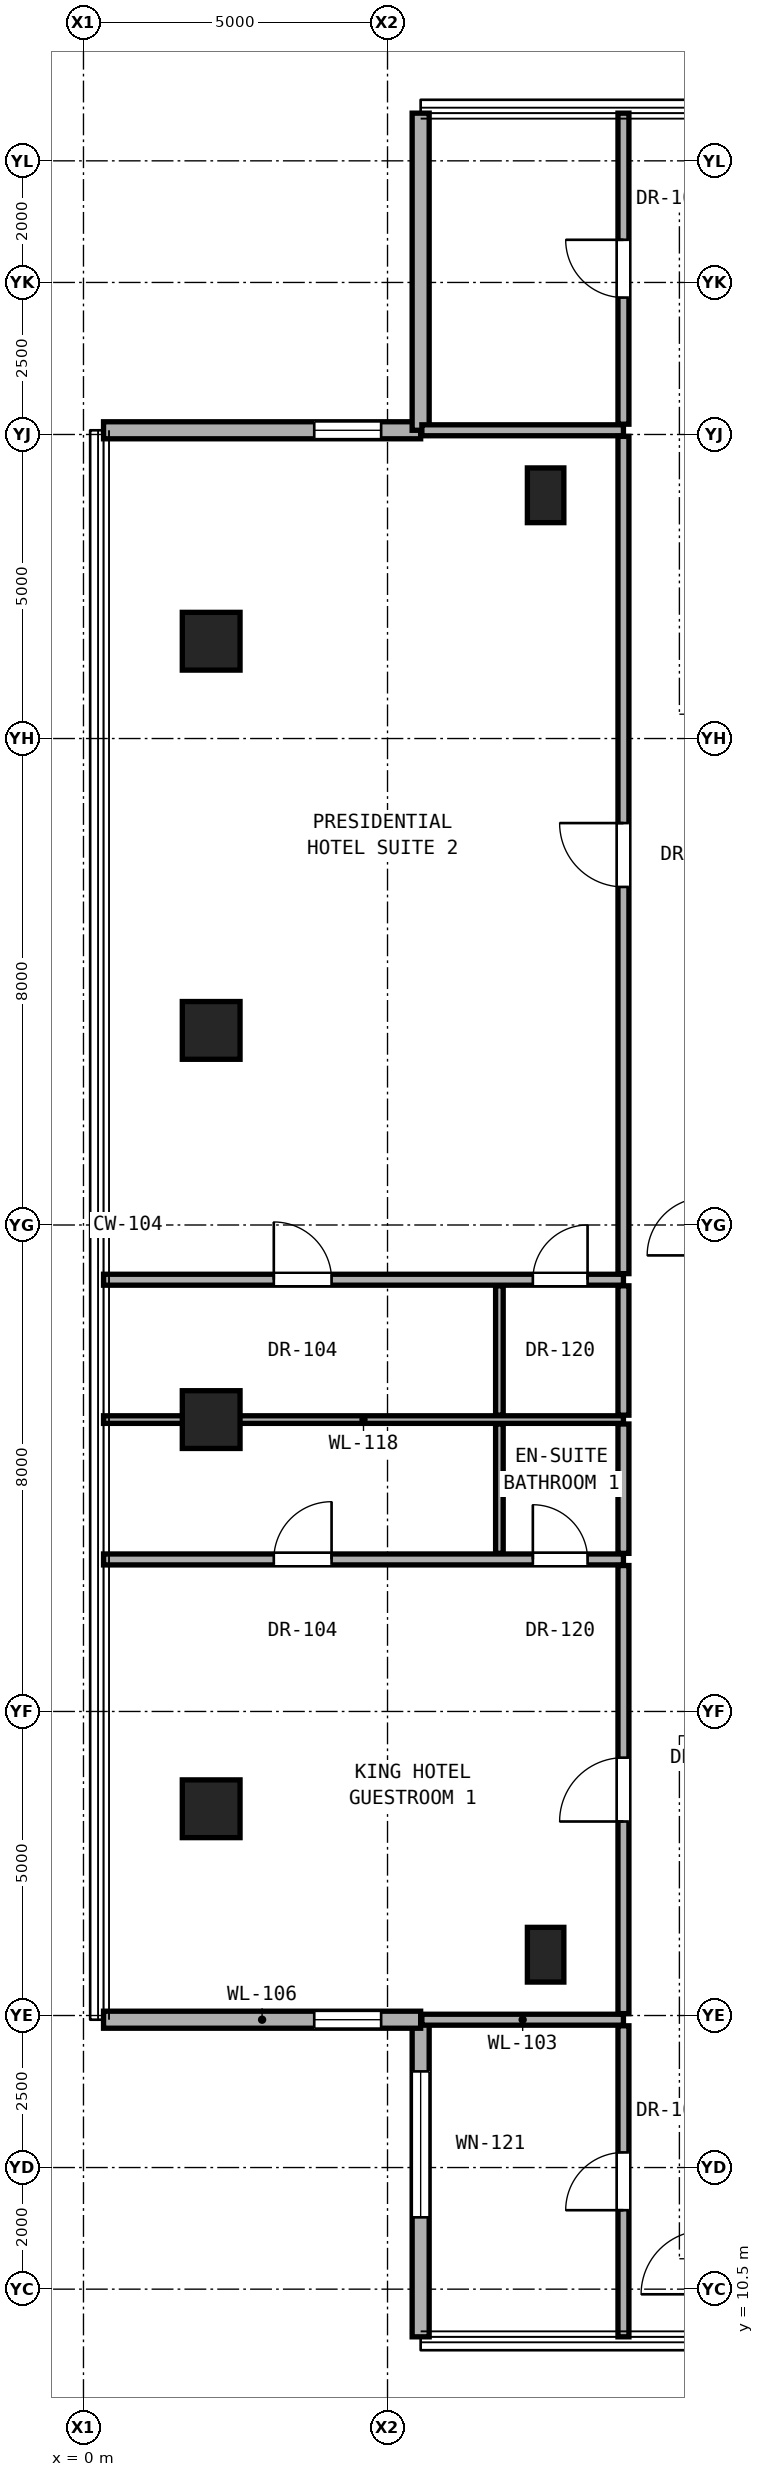
"""IFC4 building model, lengths in metres.
Left out: names, types, materials, properties, quantities, classifications, styles, units other than length and angle.
Written with IfcOpenShell. Run it as: python <this file> out.ifc"""

import sys

from ifc_helpers import new_model, si_unit, direction, frame, frame_2d, origin, origin_2d, place, context, subcontext, project, spatial, rectangle, hollow_rectangle, extrude, element, fill, save


model = new_model("IFC4")
c1 = context("Model", 3, precision=1e-05, world=origin(), true_north=direction((0.0, 1.0)))
c2 = subcontext(c1, "Body", "Model", "MODEL_VIEW")
j1 = project(units=[si_unit("LENGTHUNIT", "METRE"), si_unit("PLANEANGLEUNIT", "RADIAN")], contexts=[c1])
p1 = place(None, origin())
s1 = spatial("IfcSite", under=j1, at=p1, CompositionType="ELEMENT")
p2 = place(p1, origin())
s2 = spatial("IfcBuilding", under=s1, at=p2, CompositionType="ELEMENT")
p3 = place(p2, frame((0.0, 0.0, 193.4)))
s3 = spatial("IfcBuildingStorey", under=s2, at=p3, CompositionType="ELEMENT", Elevation=193.4)
for number, where, z_axis, x_axis in (
    (1, (2.1, 18.4, 0.0), (0.0, 0.0, 1.0), (1.0, 0.0, 0.0)),
    (2, (2.1, 24.8, 0.0), (0.0, 0.0, 1.0), (1.0, 0.0, 0.0)),
    (3, (2.1, 31.2, 0.0), (0.0, 0.0, 1.0), (1.0, 0.0, 0.0)),
    (4, (2.1, 37.6, 0.0), (0.0, 0.0, 1.0), (1.0, 0.0, 0.0)),
):
    element("IfcColumn", number, at=place(p3, frame(where, z_axis=z_axis, x_axis=x_axis)), inside=s3, PredefinedType="COLUMN", context=c2, shape_type="SweptSolid", body=[
        extrude(hollow_rectangle(XDim=0.95, YDim=0.95, WallThickness=0.05, at=origin_2d()), origin(), (0.0, 0.0, 1.0), 3.25),
    ])
for number, where, z_axis, x_axis in (
    (5, (7.6, 16.0, 0.0), (0.0, 0.0, 1.0), (1.0, 0.0, 0.0)),
    (6, (7.6, 40.0, 0.0), (0.0, 0.0, 1.0), (1.0, 0.0, 0.0)),
):
    element("IfcColumn", number, at=place(p3, frame(where, z_axis=z_axis, x_axis=x_axis)), inside=s3, PredefinedType="PILASTER", context=c2, shape_type="SweptSolid", body=[
        extrude(rectangle(XDim=0.6, YDim=0.9, at=origin_2d()), origin(), (0.0, 0.0, 1.0), 3.25),
    ])
p4 = place(p3, frame((5.545, 14.931, 0.0), z_axis=(0.0, 0.0, 1.0), x_axis=(0.0, -1.0, 0.0)))
e7 = element("IfcWall", 7, at=p4, inside=s3, PredefinedType="SOLIDWALL", context=c2, shape_type="SweptSolid", body=[
    extrude(rectangle(XDim=5.215, YDim=0.28, at=frame_2d((2.607, 0.0))), origin(), (0.0, 0.0, 1.0), 3.03),
])
p5 = place(p4, frame((0.85, 0.0, 0.53)))
e8 = element("IfcOpeningElement", 8, at=p5, cuts=e7, PredefinedType="OPENING", context=c2, shape_type="SweptSolid", body=[
    extrude(rectangle(XDim=2.4, YDim=2.35, at=frame_2d((1.2, 1.175))), frame((0.0, 0.15, 0.0), z_axis=(0.0, -1.0, 0.0), x_axis=(1.0, 0.0, 0.0)), (0.0, 0.0, 1.0), 0.3),
])
p6 = place(p3, frame((0.33, 14.931, 0.0), z_axis=(0.0, 0.0, 1.0), x_axis=(1.0, 0.0, 0.0)))
e9 = element("IfcWall", 9, at=p6, inside=s3, PredefinedType="SOLIDWALL", context=c2, shape_type="SweptSolid", body=[
    extrude(rectangle(XDim=5.215, YDim=0.28, at=frame_2d((2.607, 0.0))), origin(), (0.0, 0.0, 1.0), 3.03),
])
p7 = place(p6, frame((3.465, 0.0, 0.85)))
e10 = element("IfcOpeningElement", 10, at=p7, cuts=e9, PredefinedType="OPENING", context=c2, shape_type="SweptSolid", body=[
    extrude(rectangle(XDim=1.1, YDim=2.0, at=frame_2d((0.55, 1.0))), frame((0.0, 0.15, 0.0), z_axis=(0.0, -1.0, 0.0), x_axis=(1.0, 0.0, 0.0)), (0.0, 0.0, 1.0), 0.3),
])
p8 = place(p3, frame((5.545, 41.069, 0.0), z_axis=(0.0, 0.0, 1.0), x_axis=(-1.0, 0.0, 0.0)))
e11 = element("IfcWall", 11, at=p8, inside=s3, PredefinedType="SOLIDWALL", context=c2, shape_type="SweptSolid", body=[
    extrude(rectangle(XDim=5.215, YDim=0.28, at=frame_2d((2.607, 0.0))), origin(), (0.0, 0.0, 1.0), 3.03),
])
p9 = place(p8, frame((0.65, 0.0, 0.85)))
e12 = element("IfcOpeningElement", 12, at=p9, cuts=e11, PredefinedType="OPENING", context=c2, shape_type="SweptSolid", body=[
    extrude(rectangle(XDim=1.1, YDim=2.0, at=frame_2d((0.55, 1.0))), frame((0.0, 0.15, 0.0), z_axis=(0.0, -1.0, 0.0), x_axis=(1.0, 0.0, 0.0)), (0.0, 0.0, 1.0), 0.3),
])
p10 = place(p3, frame((5.545, 46.284, 0.0), z_axis=(0.0, 0.0, 1.0), x_axis=(0.0, -1.0, 0.0)))
e13 = element("IfcWall", 13, at=p10, inside=s3, PredefinedType="SOLIDWALL", context=c2, shape_type="SweptSolid", body=[
    extrude(rectangle(XDim=5.215, YDim=0.28, at=frame_2d((2.607, 0.0))), origin(), (0.0, 0.0, 1.0), 3.03),
])
p11 = place(p3, frame((5.565, 14.931, 0.0), z_axis=(0.0, 0.0, 1.0), x_axis=(1.0, 0.0, 0.0)))
e14 = element("IfcWall", 14, at=p11, inside=s3, PredefinedType="PARTITIONING", context=c2, shape_type="SweptSolid", body=[
    extrude(rectangle(XDim=3.315, YDim=0.18, at=frame_2d((1.657, 0.0))), origin(), (0.0, 0.0, 1.0), 3.05),
])
p12 = place(p3, frame((0.33, 22.5, 0.0), z_axis=(0.0, 0.0, 1.0), x_axis=(1.0, 0.0, 0.0)))
e15 = element("IfcWall", 15, at=p12, inside=s3, PredefinedType="PARTITIONING", context=c2, shape_type="SweptSolid", body=[
    extrude(rectangle(XDim=8.55, YDim=0.18, at=frame_2d((4.275, 0.0))), origin(), (0.0, 0.0, 1.0), 2.269),
])
p13 = place(p12, frame((2.8, 0.0, 0.0)))
e16 = element("IfcOpeningElement", 16, at=p13, cuts=e15, PredefinedType="OPENING", context=c2, shape_type="SweptSolid", body=[
    extrude(rectangle(XDim=0.95, YDim=2.15, at=frame_2d((0.475, 1.075))), frame((0.0, 0.1, 0.0), z_axis=(0.0, -1.0, 0.0), x_axis=(1.0, 0.0, 0.0)), (0.0, 0.0, 1.0), 0.2),
])
p14 = place(p12, frame((7.06, 0.0, 0.0)))
e17 = element("IfcOpeningElement", 17, at=p14, cuts=e15, PredefinedType="OPENING", context=c2, shape_type="SweptSolid", body=[
    extrude(rectangle(XDim=0.9, YDim=2.1, at=frame_2d((0.45, 1.05))), frame((0.0, 0.1, 0.0), z_axis=(0.0, -1.0, 0.0), x_axis=(1.0, 0.0, 0.0)), (0.0, 0.0, 1.0), 0.2),
])
p15 = place(p3, frame((0.33, 24.8, 0.0), z_axis=(0.0, 0.0, 1.0), x_axis=(1.0, 0.0, 0.0)))
e18 = element("IfcWall", 18, at=p15, inside=s3, PredefinedType="PARTITIONING", context=c2, shape_type="SweptSolid", body=[
    extrude(rectangle(XDim=8.55, YDim=0.125, at=frame_2d((4.275, 0.0))), origin(), (0.0, 0.0, 1.0), 2.269),
])
p16 = place(p3, frame((0.33, 27.1, 0.0), z_axis=(0.0, 0.0, 1.0), x_axis=(1.0, 0.0, 0.0)))
e19 = element("IfcWall", 19, at=p16, inside=s3, PredefinedType="PARTITIONING", context=c2, shape_type="SweptSolid", body=[
    extrude(rectangle(XDim=8.55, YDim=0.18, at=frame_2d((4.275, 0.0))), origin(), (0.0, 0.0, 1.0), 2.269),
])
p17 = place(p16, frame((2.8, 0.0, 0.0)))
e20 = element("IfcOpeningElement", 20, at=p17, cuts=e19, PredefinedType="OPENING", context=c2, shape_type="SweptSolid", body=[
    extrude(rectangle(XDim=0.95, YDim=2.15, at=frame_2d((0.475, 1.075))), frame((0.0, 0.1, 0.0), z_axis=(0.0, -1.0, 0.0), x_axis=(1.0, 0.0, 0.0)), (0.0, 0.0, 1.0), 0.2),
])
p18 = place(p16, frame((7.06, 0.0, 0.0)))
e21 = element("IfcOpeningElement", 21, at=p18, cuts=e19, PredefinedType="OPENING", context=c2, shape_type="SweptSolid", body=[
    extrude(rectangle(XDim=0.9, YDim=2.1, at=frame_2d((0.45, 1.05))), frame((0.0, 0.1, 0.0), z_axis=(0.0, -1.0, 0.0), x_axis=(1.0, 0.0, 0.0)), (0.0, 0.0, 1.0), 0.2),
])
p19 = place(p3, frame((5.565, 41.069, 0.0), z_axis=(0.0, 0.0, 1.0), x_axis=(1.0, 0.0, 0.0)))
e22 = element("IfcWall", 22, at=p19, inside=s3, PredefinedType="PARTITIONING", context=c2, shape_type="SweptSolid", body=[
    extrude(rectangle(XDim=3.315, YDim=0.18, at=frame_2d((1.657, 0.0))), origin(), (0.0, 0.0, 1.0), 3.05),
])
for number, where, z_axis, x_axis in (
    (23, (6.84, 22.6, 0.0), (0.0, 0.0, 1.0), (0.0, 1.0, 0.0)),
    (24, (6.84, 24.873, 0.0), (0.0, 0.0, 1.0), (0.0, 1.0, 0.0)),
):
    element("IfcWall", number, at=place(p3, frame(where, z_axis=z_axis, x_axis=x_axis)), inside=s3, PredefinedType="PARTITIONING", context=c2, shape_type="SweptSolid", body=[
        extrude(rectangle(XDim=2.127, YDim=0.125, at=frame_2d((1.064, 0.0))), origin(), (0.0, 0.0, 1.0), 2.346),
    ])
p20 = place(p3, frame((8.88, 9.716, 0.0), z_axis=(0.0, 0.0, 1.0), x_axis=(0.0, 1.0, 0.0)))
e25 = element("IfcWall", 25, at=p20, inside=s3, PredefinedType="PARTITIONING", context=c2, shape_type="SweptSolid", body=[
    extrude(rectangle(XDim=5.115, YDim=0.18, at=frame_2d((2.558, 0.0))), origin(), (0.0, 0.0, 1.0), 3.05),
])
p21 = place(p20, frame((2.083, 0.0, 0.0)))
e26 = element("IfcOpeningElement", 26, at=p21, cuts=e25, PredefinedType="OPENING", context=c2, shape_type="SweptSolid", body=[
    extrude(rectangle(XDim=0.95, YDim=2.15, at=frame_2d((0.475, 1.075))), frame((0.0, 0.1, 0.0), z_axis=(0.0, -1.0, 0.0), x_axis=(1.0, 0.0, 0.0)), (0.0, 0.0, 1.0), 0.2),
])
p22 = place(p3, frame((8.88, 15.031, 0.0), z_axis=(0.0, 0.0, 1.0), x_axis=(0.0, 1.0, 0.0)))
e27 = element("IfcWall", 27, at=p22, inside=s3, PredefinedType="PARTITIONING", context=c2, shape_type="SweptSolid", body=[
    extrude(rectangle(XDim=7.369, YDim=0.18, at=frame_2d((3.685, 0.0))), origin(), (0.0, 0.0, 1.0), 2.442),
])
p23 = place(p22, frame((3.159, 0.0, 0.0)))
e28 = element("IfcOpeningElement", 28, at=p23, cuts=e27, PredefinedType="OPENING", context=c2, shape_type="SweptSolid", body=[
    extrude(rectangle(XDim=1.05, YDim=2.2, at=frame_2d((0.525, 1.1))), frame((0.0, 0.1, 0.0), z_axis=(0.0, -1.0, 0.0), x_axis=(1.0, 0.0, 0.0)), (0.0, 0.0, 1.0), 0.2),
])
for number, where, z_axis, x_axis in (
    (29, (8.88, 22.6, 0.0), (0.0, 0.0, 1.0), (0.0, 1.0, 0.0)),
    (30, (8.88, 24.873, 0.0), (0.0, 0.0, 1.0), (0.0, 1.0, 0.0)),
):
    element("IfcWall", number, at=place(p3, frame(where, z_axis=z_axis, x_axis=x_axis)), inside=s3, PredefinedType="PARTITIONING", context=c2, shape_type="SweptSolid", body=[
        extrude(rectangle(XDim=2.127, YDim=0.18, at=frame_2d((1.064, 0.0))), origin(), (0.0, 0.0, 1.0), 2.346),
    ])
p24 = place(p3, frame((8.88, 27.2, 0.0), z_axis=(0.0, 0.0, 1.0), x_axis=(0.0, 1.0, 0.0)))
e31 = element("IfcWall", 31, at=p24, inside=s3, PredefinedType="PARTITIONING", context=c2, shape_type="SweptSolid", body=[
    extrude(rectangle(XDim=13.769, YDim=0.18, at=frame_2d((6.885, 0.0))), origin(), (0.0, 0.0, 1.0), 2.346),
])
p25 = place(p24, frame((6.36, 0.0, 0.0)))
e32 = element("IfcOpeningElement", 32, at=p25, cuts=e31, PredefinedType="OPENING", context=c2, shape_type="SweptSolid", body=[
    extrude(rectangle(XDim=1.05, YDim=2.2, at=frame_2d((0.525, 1.1))), frame((0.0, 0.1, 0.0), z_axis=(0.0, -1.0, 0.0), x_axis=(1.0, 0.0, 0.0)), (0.0, 0.0, 1.0), 0.2),
])
p26 = place(p3, frame((8.88, 41.169, 0.0), z_axis=(0.0, 0.0, 1.0), x_axis=(0.0, 1.0, 0.0)))
e33 = element("IfcWall", 33, at=p26, inside=s3, PredefinedType="PARTITIONING", context=c2, shape_type="SweptSolid", body=[
    extrude(rectangle(XDim=5.115, YDim=0.18, at=frame_2d((2.558, 0.0))), origin(), (0.0, 0.0, 1.0), 3.05),
])
p27 = place(p26, frame((2.083, 0.0, 0.0)))
e34 = element("IfcOpeningElement", 34, at=p27, cuts=e33, PredefinedType="OPENING", context=c2, shape_type="SweptSolid", body=[
    extrude(rectangle(XDim=0.95, YDim=2.15, at=frame_2d((0.475, 1.075))), frame((0.0, 0.1, 0.0), z_axis=(0.0, -1.0, 0.0), x_axis=(1.0, 0.0, 0.0)), (0.0, 0.0, 1.0), 0.2),
])
p28 = place(p5, origin())
e35 = element("IfcWindow", 35, at=p28, inside=s3, PartitioningType="SINGLE_PANEL", PredefinedType="WINDOW", context=c2, shape_type="SweptSolid", body=[
    extrude(rectangle(XDim=2.4, YDim=2.35, at=frame_2d((1.2, 1.175))), frame((0.0, 0.03, 0.0), z_axis=(0.0, -1.0, 0.0), x_axis=(1.0, 0.0, 0.0)), (0.0, 0.0, 1.0), 0.06),
])
fill(e8, e35)
p29 = place(p7, origin())
e36 = element("IfcWindow", 36, at=p29, inside=s3, PartitioningType="SINGLE_PANEL", PredefinedType="WINDOW", context=c2, shape_type="SweptSolid", body=[
    extrude(rectangle(XDim=1.1, YDim=2.0, at=frame_2d((0.55, 1.0))), frame((0.0, 0.03, 0.0), z_axis=(0.0, -1.0, 0.0), x_axis=(1.0, 0.0, 0.0)), (0.0, 0.0, 1.0), 0.06),
])
fill(e10, e36)
p30 = place(p9, origin())
e37 = element("IfcWindow", 37, at=p30, inside=s3, PartitioningType="SINGLE_PANEL", PredefinedType="WINDOW", context=c2, shape_type="SweptSolid", body=[
    extrude(rectangle(XDim=1.1, YDim=2.0, at=frame_2d((0.55, 1.0))), frame((0.0, 0.03, 0.0), z_axis=(0.0, -1.0, 0.0), x_axis=(1.0, 0.0, 0.0)), (0.0, 0.0, 1.0), 0.06),
])
fill(e12, e37)
p31 = place(p23, origin())
e38 = element("IfcDoor", 38, at=p31, inside=s3, OperationType="SINGLE_SWING_LEFT", PredefinedType="DOOR", context=c2, shape_type="SweptSolid", body=[
    extrude(rectangle(XDim=1.05, YDim=2.2, at=frame_2d((0.525, 1.1))), frame((0.0, 0.025, 0.0), z_axis=(0.0, -1.0, 0.0), x_axis=(1.0, 0.0, 0.0)), (0.0, 0.0, 1.0), 0.05),
])
fill(e28, e38)
p32 = place(p13, origin())
e39 = element("IfcDoor", 39, at=p32, inside=s3, OperationType="SINGLE_SWING_RIGHT", PredefinedType="DOOR", context=c2, shape_type="SweptSolid", body=[
    extrude(rectangle(XDim=0.95, YDim=2.15, at=frame_2d((0.475, 1.075))), frame((0.0, 0.025, 0.0), z_axis=(0.0, -1.0, 0.0), x_axis=(1.0, 0.0, 0.0)), (0.0, 0.0, 1.0), 0.05),
])
fill(e16, e39)
p33 = place(p14, origin())
e40 = element("IfcDoor", 40, at=p33, inside=s3, OperationType="SINGLE_SWING_LEFT", PredefinedType="DOOR", context=c2, shape_type="SweptSolid", body=[
    extrude(rectangle(XDim=0.9, YDim=2.1, at=frame_2d((0.45, 1.05))), frame((0.0, 0.025, 0.0), z_axis=(0.0, -1.0, 0.0), x_axis=(1.0, 0.0, 0.0)), (0.0, 0.0, 1.0), 0.05),
])
fill(e17, e40)
p34 = place(p25, origin())
e41 = element("IfcDoor", 41, at=p34, inside=s3, OperationType="SINGLE_SWING_RIGHT", PredefinedType="DOOR", context=c2, shape_type="SweptSolid", body=[
    extrude(rectangle(XDim=1.05, YDim=2.2, at=frame_2d((0.525, 1.1))), frame((0.0, 0.025, 0.0), z_axis=(0.0, -1.0, 0.0), x_axis=(1.0, 0.0, 0.0)), (0.0, 0.0, 1.0), 0.05),
])
fill(e32, e41)
p35 = place(p17, origin())
e42 = element("IfcDoor", 42, at=p35, inside=s3, OperationType="SINGLE_SWING_LEFT", PredefinedType="DOOR", context=c2, shape_type="SweptSolid", body=[
    extrude(rectangle(XDim=0.95, YDim=2.15, at=frame_2d((0.475, 1.075))), frame((0.0, 0.025, 0.0), z_axis=(0.0, -1.0, 0.0), x_axis=(1.0, 0.0, 0.0)), (0.0, 0.0, 1.0), 0.05),
])
fill(e20, e42)
p36 = place(p18, origin())
e43 = element("IfcDoor", 43, at=p36, inside=s3, OperationType="SINGLE_SWING_RIGHT", PredefinedType="DOOR", context=c2, shape_type="SweptSolid", body=[
    extrude(rectangle(XDim=0.9, YDim=2.1, at=frame_2d((0.45, 1.05))), frame((0.0, 0.025, 0.0), z_axis=(0.0, -1.0, 0.0), x_axis=(1.0, 0.0, 0.0)), (0.0, 0.0, 1.0), 0.05),
])
fill(e21, e43)
p37 = place(p21, origin())
e44 = element("IfcDoor", 44, at=p37, inside=s3, OperationType="SINGLE_SWING_LEFT", PredefinedType="DOOR", context=c2, shape_type="SweptSolid", body=[
    extrude(rectangle(XDim=0.95, YDim=2.15, at=frame_2d((0.475, 1.075))), frame((0.0, 0.025, 0.0), z_axis=(0.0, -1.0, 0.0), x_axis=(1.0, 0.0, 0.0)), (0.0, 0.0, 1.0), 0.05),
])
fill(e26, e44)
p38 = place(p27, origin())
e45 = element("IfcDoor", 45, at=p38, inside=s3, OperationType="SINGLE_SWING_RIGHT", PredefinedType="DOOR", context=c2, shape_type="SweptSolid", body=[
    extrude(rectangle(XDim=0.95, YDim=2.15, at=frame_2d((0.475, 1.075))), frame((0.0, 0.025, 0.0), z_axis=(0.0, -1.0, 0.0), x_axis=(1.0, 0.0, 0.0)), (0.0, 0.0, 1.0), 0.05),
])
fill(e34, e45)
save(model, sys.argv[1])
